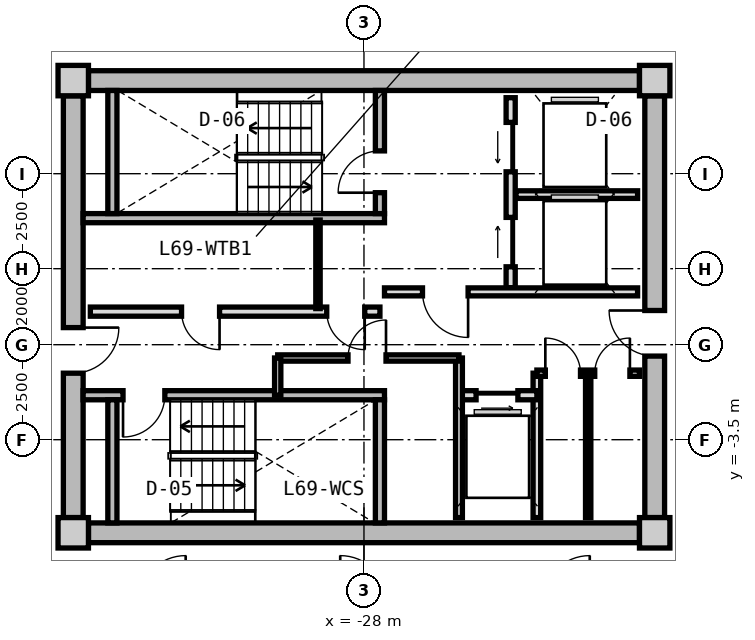
"""IFC4 building model, lengths in metres.
Left out: names, types, materials, properties, quantities, classifications, styles, units other than length and angle.
Written with IfcOpenShell. Run it as: python <this file> out.ifc"""

import sys

from ifc_helpers import new_model, si_unit, direction, frame, frame_2d, origin, origin_2d, place, context, subcontext, project, spatial, rectangle, extrude, source, transform, mapped, element, fill, save


model = new_model("IFC4")
c1 = context("Model", 3, precision=1e-05, world=origin(), true_north=direction((0.0, 1.0)))
c2 = subcontext(c1, "Body", "Model", "MODEL_VIEW")
j1 = project(units=[si_unit("LENGTHUNIT", "METRE"), si_unit("PLANEANGLEUNIT", "RADIAN")], contexts=[c1])
p1 = place(None, origin())
s1 = spatial("IfcSite", under=j1, at=p1, CompositionType="ELEMENT")
p2 = place(p1, origin())
s2 = spatial("IfcBuilding", under=s1, at=p2, CompositionType="ELEMENT")
p3 = place(p2, frame((0.0, 0.0, 223.05)))
s3 = spatial("IfcBuildingStorey", under=s2, at=p3, CompositionType="ELEMENT", Elevation=223.05)
m1 = source(origin(), c2, "Body", "SweptSolid", [
    extrude(rectangle(XDim=0.8, YDim=0.8, at=origin_2d()), origin(), (0.0, 0.0, 1.0), 3.05),
])
for number, where, z_axis, x_axis in (
    (1, (-35.65, -5.95, 0.0), (0.0, 0.0, 1.0), (1.0, 0.0, 0.0)),
    (2, (-20.35, -5.95, 0.0), (0.0, 0.0, 1.0), (1.0, 0.0, 0.0)),
    (3, (-20.35, 5.95, 0.0), (0.0, 0.0, 1.0), (1.0, 0.0, 0.0)),
    (4, (-35.65, 5.95, 0.0), (0.0, 0.0, 1.0), (1.0, 0.0, 0.0)),
):
    element("IfcColumn", number, at=place(p3, frame(where, z_axis=z_axis, x_axis=x_axis)), inside=s3, PredefinedType="COLUMN", context=c2, shape_type="MappedRepresentation", body=[
        mapped(m1, transform((0.0, 0.0, 0.0), x_axis=(1.0, 0.0, 0.0), y_axis=(0.0, 1.0, 0.0), z_axis=(0.0, 0.0, 1.0), scale=1.0)),
    ])
m2 = source(origin(), c2, "Body", "SweptSolid", [
    extrude(rectangle(XDim=14.5, YDim=0.52, at=frame_2d((7.25, 0.0))), origin(), (0.0, 0.0, 1.0), 2.76),
])
for number, where, z_axis, x_axis in (
    (5, (-35.25, 5.95, 0.0), (0.0, 0.0, 1.0), (1.0, 0.0, 0.0)),
    (6, (-20.75, -5.95, 0.0), (0.0, 0.0, 1.0), (-1.0, 0.0, 0.0)),
):
    element("IfcWall", number, at=place(p3, frame(where, z_axis=z_axis, x_axis=x_axis)), inside=s3, PredefinedType="SHEAR", context=c2, shape_type="MappedRepresentation", body=[
        mapped(m2, transform((0.0, 0.0, 0.0), x_axis=(1.0, 0.0, 0.0), y_axis=(0.0, 1.0, 0.0), z_axis=(0.0, 0.0, 1.0), scale=1.0)),
    ])
m3 = source(origin(), c2, "Body", "SweptSolid", [
    extrude(rectangle(XDim=11.1, YDim=0.52, at=frame_2d((5.55, 0.0))), origin(), (0.0, 0.0, 1.0), 2.76),
])
p4 = place(p3, frame((-35.65, -5.55, 0.0), z_axis=(0.0, 0.0, 1.0), x_axis=(0.0, 1.0, 0.0)))
e7 = element("IfcWall", 7, at=p4, inside=s3, PredefinedType="SHEAR", context=c2, shape_type="MappedRepresentation", body=[
    mapped(m3, transform((0.0, 0.0, 0.0), x_axis=(1.0, 0.0, 0.0), y_axis=(0.0, 1.0, 0.0), z_axis=(0.0, 0.0, 1.0), scale=1.0)),
])
p5 = place(p4, frame((3.8, 0.0, 0.0)))
e8 = element("IfcOpeningElement", 8, at=p5, cuts=e7, PredefinedType="OPENING", context=c2, shape_type="SweptSolid", body=[
    extrude(rectangle(XDim=1.2, YDim=2.15, at=frame_2d((0.6, 1.075))), frame((0.0, 0.27, 0.0), z_axis=(0.0, -1.0, 0.0), x_axis=(1.0, 0.0, 0.0)), (0.0, 0.0, 1.0), 0.54),
])
p6 = place(p3, frame((-20.35, 5.55, 0.0), z_axis=(0.0, 0.0, 1.0), x_axis=(0.0, -1.0, 0.0)))
e9 = element("IfcWall", 9, at=p6, inside=s3, PredefinedType="SHEAR", context=c2, shape_type="MappedRepresentation", body=[
    mapped(m3, transform((0.0, 0.0, 0.0), x_axis=(1.0, 0.0, 0.0), y_axis=(0.0, 1.0, 0.0), z_axis=(0.0, 0.0, 1.0), scale=1.0)),
])
p7 = place(p6, frame((5.65, 0.0, 0.0)))
e10 = element("IfcOpeningElement", 10, at=p7, cuts=e9, PredefinedType="OPENING", context=c2, shape_type="SweptSolid", body=[
    extrude(rectangle(XDim=1.2, YDim=2.15, at=frame_2d((0.6, 1.075))), frame((0.0, 0.27, 0.0), z_axis=(0.0, -1.0, 0.0), x_axis=(1.0, 0.0, 0.0)), (0.0, 0.0, 1.0), 0.54),
])
m4 = source(origin(), c2, "Body", "SweptSolid", [
    extrude(rectangle(XDim=7.93, YDim=0.24, at=frame_2d((3.965, 0.0))), origin(), (0.0, 0.0, 1.0), 2.76),
])
p8 = place(p3, frame((-35.39, 2.33, 0.0), z_axis=(0.0, 0.0, 1.0), x_axis=(1.0, 0.0, 0.0)))
e11 = element("IfcWall", 11, at=p8, inside=s3, PredefinedType="PARTITIONING", context=c2, shape_type="MappedRepresentation", body=[
    mapped(m4, transform((0.0, 0.0, 0.0), x_axis=(1.0, 0.0, 0.0), y_axis=(0.0, 1.0, 0.0), z_axis=(0.0, 0.0, 1.0), scale=1.0)),
])
m5 = source(origin(), c2, "Body", "SweptSolid", [
    extrude(rectangle(XDim=3.24, YDim=0.24, at=frame_2d((1.62, 0.0))), origin(), (0.0, 0.0, 1.0), 2.76),
])
p9 = place(p3, frame((-34.62, 2.45, 0.0), z_axis=(0.0, 0.0, 1.0), x_axis=(0.0, 1.0, 0.0)))
e12 = element("IfcWall", 12, at=p9, inside=s3, PredefinedType="PARTITIONING", context=c2, shape_type="MappedRepresentation", body=[
    mapped(m5, transform((0.0, 0.0, 0.0), x_axis=(1.0, 0.0, 0.0), y_axis=(0.0, 1.0, 0.0), z_axis=(0.0, 0.0, 1.0), scale=1.0)),
])
p10 = place(p3, frame((-27.58, 2.45, 0.0), z_axis=(0.0, 0.0, 1.0), x_axis=(0.0, 1.0, 0.0)))
e13 = element("IfcWall", 13, at=p10, inside=s3, PredefinedType="PARTITIONING", context=c2, shape_type="MappedRepresentation", body=[
    mapped(m5, transform((0.0, 0.0, 0.0), x_axis=(1.0, 0.0, 0.0), y_axis=(0.0, 1.0, 0.0), z_axis=(0.0, 0.0, 1.0), scale=1.0)),
])
p11 = place(p10, frame((0.55, 0.0, 0.0)))
e14 = element("IfcOpeningElement", 14, at=p11, cuts=e13, PredefinedType="OPENING", context=c2, shape_type="SweptSolid", body=[
    extrude(rectangle(XDim=1.1, YDim=2.15, at=frame_2d((0.55, 1.075))), frame((0.0, 0.13, 0.0), z_axis=(0.0, -1.0, 0.0), x_axis=(1.0, 0.0, 0.0)), (0.0, 0.0, 1.0), 0.26),
])
p12 = place(p3, frame((-35.39, -2.33, 0.0), z_axis=(0.0, 0.0, 1.0), x_axis=(1.0, 0.0, 0.0)))
e15 = element("IfcWall", 15, at=p12, inside=s3, PredefinedType="PARTITIONING", context=c2, shape_type="MappedRepresentation", body=[
    mapped(m4, transform((0.0, 0.0, 0.0), x_axis=(1.0, 0.0, 0.0), y_axis=(0.0, 1.0, 0.0), z_axis=(0.0, 0.0, 1.0), scale=1.0)),
])
p13 = place(p12, frame((1.05, 0.0, 0.0)))
e16 = element("IfcOpeningElement", 16, at=p13, cuts=e15, PredefinedType="OPENING", context=c2, shape_type="SweptSolid", body=[
    extrude(rectangle(XDim=1.1, YDim=2.15, at=frame_2d((0.55, 1.075))), frame((0.0, 0.13, 0.0), z_axis=(0.0, -1.0, 0.0), x_axis=(1.0, 0.0, 0.0)), (0.0, 0.0, 1.0), 0.26),
])
for number, where, z_axis, x_axis in (
    (17, (-34.62, -5.69, 0.0), (0.0, 0.0, 1.0), (0.0, 1.0, 0.0)),
    (18, (-27.58, -5.69, 0.0), (0.0, 0.0, 1.0), (0.0, 1.0, 0.0)),
):
    element("IfcWall", number, at=place(p3, frame(where, z_axis=z_axis, x_axis=x_axis)), inside=s3, PredefinedType="PARTITIONING", context=c2, shape_type="MappedRepresentation", body=[
        mapped(m5, transform((0.0, 0.0, 0.0), x_axis=(1.0, 0.0, 0.0), y_axis=(0.0, 1.0, 0.0), z_axis=(0.0, 0.0, 1.0), scale=1.0)),
    ])
m6 = source(origin(), c2, "Body", "SweptSolid", [
    extrude(rectangle(XDim=5.0, YDim=0.24, at=frame_2d((2.5, 0.0))), origin(), (0.0, 0.0, 1.0), 2.745),
])
p14 = place(p3, frame((-24.14, 0.5, 0.0), z_axis=(0.0, 0.0, 1.0), x_axis=(0.0, 1.0, 0.0)))
e19 = element("IfcWall", 19, at=p14, inside=s3, PredefinedType="PARTITIONING", context=c2, shape_type="MappedRepresentation", body=[
    mapped(m6, transform((0.0, 0.0, 0.0), x_axis=(1.0, 0.0, 0.0), y_axis=(0.0, 1.0, 0.0), z_axis=(0.0, 0.0, 1.0), scale=1.0)),
])
p15 = place(p14, frame((3.05, 0.0, 0.0)))
e20 = element("IfcOpeningElement", 20, at=p15, cuts=e19, PredefinedType="OPENING", context=c2, shape_type="SweptSolid", body=[
    extrude(rectangle(XDim=1.3, YDim=2.2, at=frame_2d((0.65, 1.1))), frame((0.0, 0.13, 0.0), z_axis=(0.0, -1.0, 0.0), x_axis=(1.0, 0.0, 0.0)), (0.0, 0.0, 1.0), 0.26),
])
p16 = place(p14, frame((0.55, 0.0, 0.0)))
e21 = element("IfcOpeningElement", 21, at=p16, cuts=e19, PredefinedType="OPENING", context=c2, shape_type="SweptSolid", body=[
    extrude(rectangle(XDim=1.3, YDim=2.2, at=frame_2d((0.65, 1.1))), frame((0.0, 0.13, 0.0), z_axis=(0.0, -1.0, 0.0), x_axis=(1.0, 0.0, 0.0)), (0.0, 0.0, 1.0), 0.26),
])
m7 = source(origin(), c2, "Body", "SweptSolid", [
    extrude(rectangle(XDim=3.2, YDim=0.2, at=frame_2d((1.6, 0.0))), origin(), (0.0, 0.0, 1.0), 2.745),
])
p17 = place(p3, frame((-24.0, 2.95, 0.0), z_axis=(0.0, 0.0, 1.0), x_axis=(1.0, 0.0, 0.0)))
e22 = element("IfcWall", 22, at=p17, inside=s3, PredefinedType="PARTITIONING", context=c2, shape_type="MappedRepresentation", body=[
    mapped(m7, transform((0.0, 0.0, 0.0), x_axis=(1.0, 0.0, 0.0), y_axis=(0.0, 1.0, 0.0), z_axis=(0.0, 0.0, 1.0), scale=1.0)),
])
m8 = source(origin(), c2, "Body", "SweptSolid", [
    extrude(rectangle(XDim=6.66, YDim=0.21, at=frame_2d((3.33, 0.0))), origin(), (0.0, 0.0, 1.0), 2.745),
])
p18 = place(p3, frame((-27.46, 0.39, 0.0), z_axis=(0.0, 0.0, 1.0), x_axis=(1.0, 0.0, 0.0)))
e23 = element("IfcWall", 23, at=p18, inside=s3, PredefinedType="PARTITIONING", context=c2, shape_type="MappedRepresentation", body=[
    mapped(m8, transform((0.0, 0.0, 0.0), x_axis=(1.0, 0.0, 0.0), y_axis=(0.0, 1.0, 0.0), z_axis=(0.0, 0.0, 1.0), scale=1.0)),
])
p19 = place(p18, frame((1.0, 0.0, 0.0)))
e24 = element("IfcOpeningElement", 24, at=p19, cuts=e23, PredefinedType="OPENING", context=c2, shape_type="SweptSolid", body=[
    extrude(rectangle(XDim=1.2, YDim=2.15, at=frame_2d((0.6, 1.075))), frame((0.0, 0.115, 0.0), z_axis=(0.0, -1.0, 0.0), x_axis=(1.0, 0.0, 0.0)), (0.0, 0.0, 1.0), 0.23),
])
m9 = source(origin(), c2, "Body", "SweptSolid", [
    extrude(rectangle(XDim=7.62, YDim=0.24, at=frame_2d((3.81, 0.0))), origin(), (0.0, 0.0, 1.0), 2.745),
])
p20 = place(p3, frame((-35.2, -0.13, 0.0), z_axis=(0.0, 0.0, 1.0), x_axis=(1.0, 0.0, 0.0)))
e25 = element("IfcWall", 25, at=p20, inside=s3, PredefinedType="PARTITIONING", context=c2, shape_type="MappedRepresentation", body=[
    mapped(m9, transform((0.0, 0.0, 0.0), x_axis=(1.0, 0.0, 0.0), y_axis=(0.0, 1.0, 0.0), z_axis=(0.0, 0.0, 1.0), scale=1.0)),
])
p21 = place(p20, frame((6.22, 0.0, 0.0)))
e26 = element("IfcOpeningElement", 26, at=p21, cuts=e25, PredefinedType="OPENING", context=c2, shape_type="SweptSolid", body=[
    extrude(rectangle(XDim=1.0, YDim=2.1, at=frame_2d((0.5, 1.05))), frame((0.0, 0.13, 0.0), z_axis=(0.0, -1.0, 0.0), x_axis=(1.0, 0.0, 0.0)), (0.0, 0.0, 1.0), 0.26),
])
p22 = place(p20, frame((2.4, 0.0, 0.0)))
e27 = element("IfcOpeningElement", 27, at=p22, cuts=e25, PredefinedType="OPENING", context=c2, shape_type="SweptSolid", body=[
    extrude(rectangle(XDim=1.0, YDim=2.1, at=frame_2d((0.5, 1.05))), frame((0.0, 0.13, 0.0), z_axis=(0.0, -1.0, 0.0), x_axis=(1.0, 0.0, 0.0)), (0.0, 0.0, 1.0), 0.26),
])
m10 = source(origin(), c2, "Body", "SweptSolid", [
    extrude(rectangle(XDim=2.33, YDim=0.115, at=frame_2d((1.165, 0.0))), origin(), (0.0, 0.0, 1.0), 2.745),
])
p23 = place(p3, frame((-29.21, -0.05, 0.0), z_axis=(0.0, 0.0, 1.0), x_axis=(0.0, 1.0, 0.0)))
e28 = element("IfcWall", 28, at=p23, inside=s3, PredefinedType="PARTITIONING", context=c2, shape_type="MappedRepresentation", body=[
    mapped(m10, transform((0.0, 0.0, 0.0), x_axis=(1.0, 0.0, 0.0), y_axis=(0.0, 1.0, 0.0), z_axis=(0.0, 0.0, 1.0), scale=1.0)),
])
m11 = source(origin(), c2, "Body", "SweptSolid", [
    extrude(rectangle(XDim=3.8, YDim=0.2, at=frame_2d((1.9, 0.0))), origin(), (0.0, 0.0, 1.0), 2.745),
])
p24 = place(p3, frame((-23.45, -5.55, 0.0), z_axis=(0.0, 0.0, 1.0), x_axis=(0.0, 1.0, 0.0)))
e29 = element("IfcWall", 29, at=p24, inside=s3, PredefinedType="PARTITIONING", context=c2, shape_type="MappedRepresentation", body=[
    mapped(m11, transform((0.0, 0.0, 0.0), x_axis=(1.0, 0.0, 0.0), y_axis=(0.0, 1.0, 0.0), z_axis=(0.0, 0.0, 1.0), scale=1.0)),
])
m12 = source(origin(), c2, "Body", "SweptSolid", [
    extrude(rectangle(XDim=2.05, YDim=0.24, at=frame_2d((1.025, 0.0))), origin(), (0.0, 0.0, 1.0), 2.745),
])
p25 = place(p3, frame((-25.5, -2.33, 0.0), z_axis=(0.0, 0.0, 1.0), x_axis=(1.0, 0.0, 0.0)))
e30 = element("IfcWall", 30, at=p25, inside=s3, PredefinedType="PARTITIONING", context=c2, shape_type="MappedRepresentation", body=[
    mapped(m12, transform((0.0, 0.0, 0.0), x_axis=(1.0, 0.0, 0.0), y_axis=(0.0, 1.0, 0.0), z_axis=(0.0, 0.0, 1.0), scale=1.0)),
])
p26 = place(p25, frame((0.45, 0.0, 0.0)))
e31 = element("IfcOpeningElement", 31, at=p26, cuts=e30, PredefinedType="OPENING", context=c2, shape_type="SweptSolid", body=[
    extrude(rectangle(XDim=1.1, YDim=2.2, at=frame_2d((0.55, 1.1))), frame((0.0, 0.13, 0.0), z_axis=(0.0, -1.0, 0.0), x_axis=(1.0, 0.0, 0.0)), (0.0, 0.0, 1.0), 0.26),
])
m13 = source(origin(), c2, "Body", "SweptSolid", [
    extrude(rectangle(XDim=4.2, YDim=0.18, at=frame_2d((2.1, 0.0))), origin(), (0.0, 0.0, 1.0), 2.745),
])
p27 = place(p3, frame((-25.5, -5.55, 0.0), z_axis=(0.0, 0.0, 1.0), x_axis=(0.0, 1.0, 0.0)))
e32 = element("IfcWall", 32, at=p27, inside=s3, PredefinedType="PARTITIONING", context=c2, shape_type="MappedRepresentation", body=[
    mapped(m13, transform((0.0, 0.0, 0.0), x_axis=(1.0, 0.0, 0.0), y_axis=(0.0, 1.0, 0.0), z_axis=(0.0, 0.0, 1.0), scale=1.0)),
])
m14 = source(origin(), c2, "Body", "SweptSolid", [
    extrude(rectangle(XDim=4.77, YDim=0.165, at=frame_2d((2.385, 0.0))), origin(), (0.0, 0.0, 1.0), 2.745),
])
p28 = place(p3, frame((-30.27, -1.35, 0.0), z_axis=(0.0, 0.0, 1.0), x_axis=(1.0, 0.0, 0.0)))
e33 = element("IfcWall", 33, at=p28, inside=s3, PredefinedType="PARTITIONING", context=c2, shape_type="MappedRepresentation", body=[
    mapped(m14, transform((0.0, 0.0, 0.0), x_axis=(1.0, 0.0, 0.0), y_axis=(0.0, 1.0, 0.0), z_axis=(0.0, 0.0, 1.0), scale=1.0)),
])
p29 = place(p28, frame((1.85, 0.0, 0.0)))
e34 = element("IfcOpeningElement", 34, at=p29, cuts=e33, PredefinedType="OPENING", context=c2, shape_type="SweptSolid", body=[
    extrude(rectangle(XDim=1.0, YDim=2.1, at=frame_2d((0.5, 1.05))), frame((0.0, 0.093, 0.0), z_axis=(0.0, -1.0, 0.0), x_axis=(1.0, 0.0, 0.0)), (0.0, 0.0, 1.0), 0.185),
])
m15 = source(origin(), c2, "Body", "SweptSolid", [
    extrude(rectangle(XDim=0.98, YDim=0.165, at=frame_2d((0.49, 0.0))), origin(), (0.0, 0.0, 1.0), 2.745),
])
p30 = place(p3, frame((-30.27, -2.33, 0.0), z_axis=(0.0, 0.0, 1.0), x_axis=(0.0, 1.0, 0.0)))
e35 = element("IfcWall", 35, at=p30, inside=s3, PredefinedType="PARTITIONING", context=c2, shape_type="MappedRepresentation", body=[
    mapped(m15, transform((0.0, 0.0, 0.0), x_axis=(1.0, 0.0, 0.0), y_axis=(0.0, 1.0, 0.0), z_axis=(0.0, 0.0, 1.0), scale=1.0)),
])
m16 = source(origin(), c2, "Body", "SweptSolid", [
    extrude(rectangle(XDim=2.7, YDim=0.165, at=frame_2d((1.35, 0.0))), origin(), (0.0, 0.0, 1.0), 2.745),
])
p31 = place(p3, frame((-23.45, -1.75, 0.0), z_axis=(0.0, 0.0, 1.0), x_axis=(1.0, 0.0, 0.0)))
e36 = element("IfcWall", 36, at=p31, inside=s3, PredefinedType="PARTITIONING", context=c2, shape_type="MappedRepresentation", body=[
    mapped(m16, transform((0.0, 0.0, 0.0), x_axis=(1.0, 0.0, 0.0), y_axis=(0.0, 1.0, 0.0), z_axis=(0.0, 0.0, 1.0), scale=1.0)),
])
p32 = place(p31, frame((0.222, 0.0, 0.0)))
e37 = element("IfcOpeningElement", 37, at=p32, cuts=e36, PredefinedType="OPENING", context=c2, shape_type="SweptSolid", body=[
    extrude(rectangle(XDim=0.925, YDim=2.1, at=frame_2d((0.462, 1.05))), frame((0.0, 0.093, 0.0), z_axis=(0.0, -1.0, 0.0), x_axis=(1.0, 0.0, 0.0)), (0.0, 0.0, 1.0), 0.185),
])
p33 = place(p31, frame((1.522, 0.0, 0.0)))
e38 = element("IfcOpeningElement", 38, at=p33, cuts=e36, PredefinedType="OPENING", context=c2, shape_type="SweptSolid", body=[
    extrude(rectangle(XDim=0.925, YDim=2.1, at=frame_2d((0.462, 1.05))), frame((0.0, 0.093, 0.0), z_axis=(0.0, -1.0, 0.0), x_axis=(1.0, 0.0, 0.0)), (0.0, 0.0, 1.0), 0.185),
])
m17 = source(origin(), c2, "Body", "SweptSolid", [
    extrude(rectangle(XDim=3.8, YDim=0.14, at=frame_2d((1.9, 0.0))), origin(), (0.0, 0.0, 1.0), 2.745),
])
p34 = place(p3, frame((-22.1, -5.55, 0.0), z_axis=(0.0, 0.0, 1.0), x_axis=(0.0, 1.0, 0.0)))
e39 = element("IfcWall", 39, at=p34, inside=s3, PredefinedType="PARTITIONING", context=c2, shape_type="MappedRepresentation", body=[
    mapped(m17, transform((0.0, 0.0, 0.0), x_axis=(1.0, 0.0, 0.0), y_axis=(0.0, 1.0, 0.0), z_axis=(0.0, 0.0, 1.0), scale=1.0)),
])
m18 = source(origin(), c2, "Body", "SweptSolid", [
    extrude(rectangle(XDim=1.1, YDim=2.15, at=frame_2d((0.55, 1.075))), frame((0.0, 0.025, 0.0), z_axis=(0.0, -1.0, 0.0), x_axis=(1.0, 0.0, 0.0)), (0.0, 0.0, 1.0), 0.05),
])
p35 = place(p11, origin())
e40 = element("IfcDoor", 40, at=p35, inside=s3, OperationType="SINGLE_SWING_LEFT", PredefinedType="DOOR", context=c2, shape_type="MappedRepresentation", body=[
    mapped(m18, transform((0.0, 0.0, 0.0), x_axis=(1.0, 0.0, 0.0), y_axis=(0.0, 1.0, 0.0), z_axis=(0.0, 0.0, 1.0), scale=1.0)),
])
fill(e14, e40)
p36 = place(p13, frame((1.1, 0.0, 0.0), z_axis=(0.0, 0.0, 1.0), x_axis=(-1.0, 0.0, 0.0)))
e41 = element("IfcDoor", 41, at=p36, inside=s3, OperationType="SINGLE_SWING_RIGHT", PredefinedType="DOOR", context=c2, shape_type="MappedRepresentation", body=[
    mapped(m18, transform((0.0, 0.0, 0.0), x_axis=(1.0, 0.0, 0.0), y_axis=(0.0, 1.0, 0.0), z_axis=(0.0, 0.0, 1.0), scale=1.0)),
])
fill(e16, e41)
m19 = source(origin(), c2, "Body", "SweptSolid", [
    extrude(rectangle(XDim=1.3, YDim=2.2, at=frame_2d((0.65, 1.1))), frame((0.0, 0.025, 0.0), z_axis=(0.0, -1.0, 0.0), x_axis=(1.0, 0.0, 0.0)), (0.0, 0.0, 1.0), 0.05),
])
p37 = place(p15, origin())
e42 = element("IfcDoor", 42, at=p37, inside=s3, OperationType="SLIDING_TO_LEFT", PredefinedType="DOOR", context=c2, shape_type="MappedRepresentation", body=[
    mapped(m19, transform((0.0, 0.0, 0.0), x_axis=(1.0, 0.0, 0.0), y_axis=(0.0, 1.0, 0.0), z_axis=(0.0, 0.0, 1.0), scale=1.0)),
])
fill(e20, e42)
p38 = place(p16, origin())
e43 = element("IfcDoor", 43, at=p38, inside=s3, OperationType="SLIDING_TO_RIGHT", PredefinedType="DOOR", context=c2, shape_type="MappedRepresentation", body=[
    mapped(m19, transform((0.0, 0.0, 0.0), x_axis=(1.0, 0.0, 0.0), y_axis=(0.0, 1.0, 0.0), z_axis=(0.0, 0.0, 1.0), scale=1.0)),
])
fill(e21, e43)
m20 = source(origin(), c2, "Body", "SweptSolid", [
    extrude(rectangle(XDim=1.2, YDim=2.15, at=frame_2d((0.6, 1.075))), frame((0.0, 0.025, 0.0), z_axis=(0.0, -1.0, 0.0), x_axis=(1.0, 0.0, 0.0)), (0.0, 0.0, 1.0), 0.05),
])
p39 = place(p19, frame((1.2, 0.0, 0.0), z_axis=(0.0, 0.0, 1.0), x_axis=(-1.0, 0.0, 0.0)))
e44 = element("IfcDoor", 44, at=p39, inside=s3, OperationType="SINGLE_SWING_LEFT", PredefinedType="DOOR", context=c2, shape_type="MappedRepresentation", body=[
    mapped(m20, transform((0.0, 0.0, 0.0), x_axis=(1.0, 0.0, 0.0), y_axis=(0.0, 1.0, 0.0), z_axis=(0.0, 0.0, 1.0), scale=1.0)),
])
fill(e24, e44)
p40 = place(p5, frame((1.2, 0.0, 0.0), z_axis=(0.0, 0.0, 1.0), x_axis=(-1.0, 0.0, 0.0)))
e45 = element("IfcDoor", 45, at=p40, inside=s3, OperationType="SINGLE_SWING_LEFT", PredefinedType="DOOR", context=c2, shape_type="MappedRepresentation", body=[
    mapped(m20, transform((0.0, 0.0, 0.0), x_axis=(1.0, 0.0, 0.0), y_axis=(0.0, 1.0, 0.0), z_axis=(0.0, 0.0, 1.0), scale=1.0)),
])
fill(e8, e45)
p41 = place(p7, frame((1.2, 0.0, 0.0), z_axis=(0.0, 0.0, 1.0), x_axis=(-1.0, 0.0, 0.0)))
e46 = element("IfcDoor", 46, at=p41, inside=s3, OperationType="SINGLE_SWING_RIGHT", PredefinedType="DOOR", context=c2, shape_type="MappedRepresentation", body=[
    mapped(m20, transform((0.0, 0.0, 0.0), x_axis=(1.0, 0.0, 0.0), y_axis=(0.0, 1.0, 0.0), z_axis=(0.0, 0.0, 1.0), scale=1.0)),
])
fill(e10, e46)
m21 = source(origin(), c2, "Body", "SweptSolid", [
    extrude(rectangle(XDim=1.0, YDim=2.1, at=frame_2d((0.5, 1.05))), frame((0.0, 0.025, 0.0), z_axis=(0.0, -1.0, 0.0), x_axis=(1.0, 0.0, 0.0)), (0.0, 0.0, 1.0), 0.05),
])
p42 = place(p21, frame((1.0, 0.0, 0.0), z_axis=(0.0, 0.0, 1.0), x_axis=(-1.0, 0.0, 0.0)))
e47 = element("IfcDoor", 47, at=p42, inside=s3, OperationType="SINGLE_SWING_LEFT", PredefinedType="DOOR", context=c2, shape_type="MappedRepresentation", body=[
    mapped(m21, transform((0.0, 0.0, 0.0), x_axis=(1.0, 0.0, 0.0), y_axis=(0.0, 1.0, 0.0), z_axis=(0.0, 0.0, 1.0), scale=1.0)),
])
fill(e26, e47)
p43 = place(p22, frame((1.0, 0.0, 0.0), z_axis=(0.0, 0.0, 1.0), x_axis=(-1.0, 0.0, 0.0)))
e48 = element("IfcDoor", 48, at=p43, inside=s3, OperationType="SINGLE_SWING_LEFT", PredefinedType="DOOR", context=c2, shape_type="MappedRepresentation", body=[
    mapped(m21, transform((0.0, 0.0, 0.0), x_axis=(1.0, 0.0, 0.0), y_axis=(0.0, 1.0, 0.0), z_axis=(0.0, 0.0, 1.0), scale=1.0)),
])
fill(e27, e48)
m22 = source(origin(), c2, "Body", "SweptSolid", [
    extrude(rectangle(XDim=1.1, YDim=2.2, at=frame_2d((0.55, 1.1))), frame((0.0, 0.025, 0.0), z_axis=(0.0, -1.0, 0.0), x_axis=(1.0, 0.0, 0.0)), (0.0, 0.0, 1.0), 0.05),
])
p44 = place(p26, frame((1.1, 0.0, 0.0), z_axis=(0.0, 0.0, 1.0), x_axis=(-1.0, 0.0, 0.0)))
e49 = element("IfcDoor", 49, at=p44, inside=s3, OperationType="SLIDING_TO_RIGHT", PredefinedType="DOOR", context=c2, shape_type="MappedRepresentation", body=[
    mapped(m22, transform((0.0, 0.0, 0.0), x_axis=(1.0, 0.0, 0.0), y_axis=(0.0, 1.0, 0.0), z_axis=(0.0, 0.0, 1.0), scale=1.0)),
])
fill(e31, e49)
p45 = place(p29, origin())
e50 = element("IfcDoor", 50, at=p45, inside=s3, OperationType="SINGLE_SWING_RIGHT", PredefinedType="DOOR", context=c2, shape_type="MappedRepresentation", body=[
    mapped(m21, transform((0.0, 0.0, 0.0), x_axis=(1.0, 0.0, 0.0), y_axis=(0.0, 1.0, 0.0), z_axis=(0.0, 0.0, 1.0), scale=1.0)),
])
fill(e34, e50)
m23 = source(origin(), c2, "Body", "SweptSolid", [
    extrude(rectangle(XDim=0.925, YDim=2.1, at=frame_2d((0.462, 1.05))), frame((0.0, 0.025, 0.0), z_axis=(0.0, -1.0, 0.0), x_axis=(1.0, 0.0, 0.0)), (0.0, 0.0, 1.0), 0.05),
])
p46 = place(p32, origin())
e51 = element("IfcDoor", 51, at=p46, inside=s3, OperationType="SINGLE_SWING_LEFT", PredefinedType="DOOR", context=c2, shape_type="MappedRepresentation", body=[
    mapped(m23, transform((0.0, 0.0, 0.0), x_axis=(1.0, 0.0, 0.0), y_axis=(0.0, 1.0, 0.0), z_axis=(0.0, 0.0, 1.0), scale=1.0)),
])
fill(e37, e51)
p47 = place(p33, origin())
e52 = element("IfcDoor", 52, at=p47, inside=s3, OperationType="SINGLE_SWING_RIGHT", PredefinedType="DOOR", context=c2, shape_type="MappedRepresentation", body=[
    mapped(m23, transform((0.0, 0.0, 0.0), x_axis=(1.0, 0.0, 0.0), y_axis=(0.0, 1.0, 0.0), z_axis=(0.0, 0.0, 1.0), scale=1.0)),
])
fill(e38, e52)
save(model, sys.argv[1])
